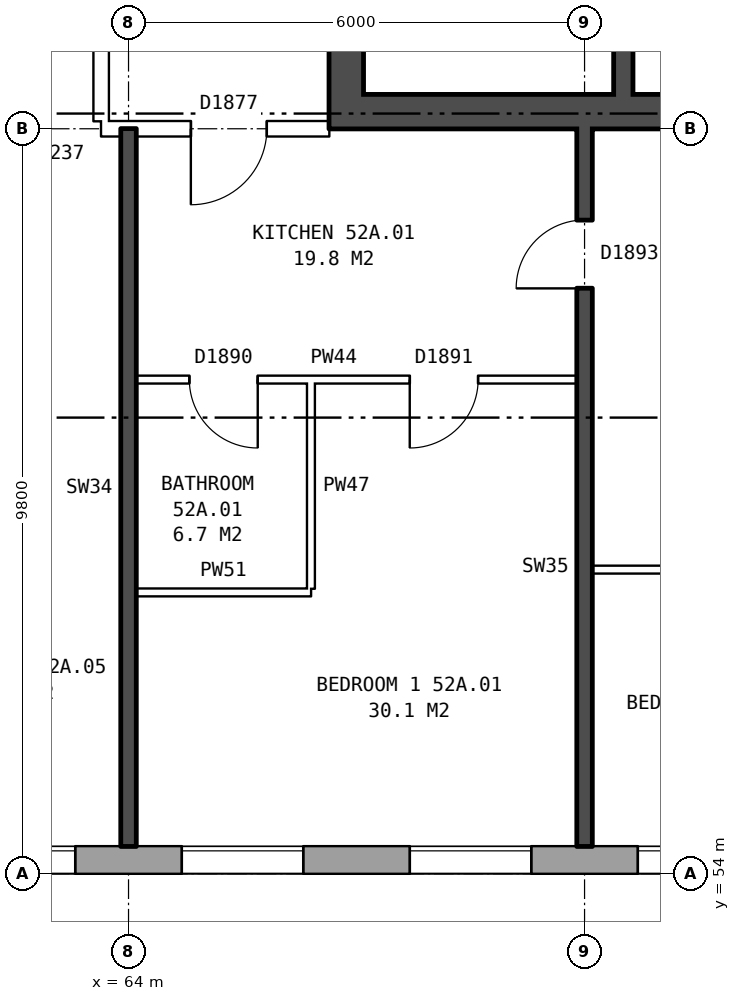
"""IFC4 building model, lengths in metres.
Left out: names, types, materials, properties, quantities, classifications, styles, units other than length and angle.
Written with IfcOpenShell. Run it as: python <this file> out.ifc"""

import sys

from ifc_helpers import new_model, si_unit, direction, frame, frame_2d, origin, place, context, subcontext, project, spatial, rectangle, extrude, element, fill, save


model = new_model("IFC4")
c1 = context("Model", 3, precision=1e-05, world=origin(), true_north=direction((0.0, 1.0)))
c2 = subcontext(c1, "Body", "Model", "MODEL_VIEW")
j1 = project(units=[si_unit("LENGTHUNIT", "METRE"), si_unit("PLANEANGLEUNIT", "RADIAN")], contexts=[c1])
p1 = place(None, origin())
s1 = spatial("IfcSite", under=j1, at=p1, CompositionType="ELEMENT")
p2 = place(p1, origin())
s2 = spatial("IfcBuilding", under=s1, at=p2, CompositionType="ELEMENT")
p3 = place(p2, frame((0.0, 0.0, 185.1)))
s3 = spatial("IfcBuildingStorey", under=s2, at=p3, CompositionType="ELEMENT", Elevation=185.1)
p4 = place(p3, frame((33.325, 54.18, 0.0), z_axis=(0.0, 0.0, 1.0), x_axis=(1.0, 0.0, 0.0)))
e1 = element("IfcWall", 1, at=p4, inside=s3, PredefinedType="STANDARD", context=c2, shape_type="SweptSolid", body=[
    extrude(rectangle(XDim=39.601, YDim=0.36, at=frame_2d((19.8, 0.0))), origin(), (0.0, 0.0, 1.0), 2.85),
])
p5 = place(p4, frame((1.375, 0.0, 0.8)))
e2 = element("IfcOpeningElement", 2, at=p5, cuts=e1, PredefinedType="OPENING", context=c2, shape_type="SweptSolid", body=[
    extrude(rectangle(XDim=1.6, YDim=1.8, at=frame_2d((0.8, 0.9))), frame((0.0, 0.19, 0.0), z_axis=(0.0, -1.0, 0.0), x_axis=(1.0, 0.0, 0.0)), (0.0, 0.0, 1.0), 0.38),
])
p6 = place(p4, frame((4.375, 0.0, 0.8)))
e3 = element("IfcOpeningElement", 3, at=p6, cuts=e1, PredefinedType="OPENING", context=c2, shape_type="SweptSolid", body=[
    extrude(rectangle(XDim=1.6, YDim=1.8, at=frame_2d((0.8, 0.9))), frame((0.0, 0.19, 0.0), z_axis=(0.0, -1.0, 0.0), x_axis=(1.0, 0.0, 0.0)), (0.0, 0.0, 1.0), 0.38),
])
p7 = place(p4, frame((7.375, 0.0, 0.8)))
e4 = element("IfcOpeningElement", 4, at=p7, cuts=e1, PredefinedType="OPENING", context=c2, shape_type="SweptSolid", body=[
    extrude(rectangle(XDim=1.6, YDim=1.8, at=frame_2d((0.8, 0.9))), frame((0.0, 0.19, 0.0), z_axis=(0.0, -1.0, 0.0), x_axis=(1.0, 0.0, 0.0)), (0.0, 0.0, 1.0), 0.38),
])
p8 = place(p4, frame((9.275, 0.0, 0.8)))
e5 = element("IfcOpeningElement", 5, at=p8, cuts=e1, PredefinedType="OPENING", context=c2, shape_type="SweptSolid", body=[
    extrude(rectangle(XDim=1.6, YDim=1.8, at=frame_2d((0.8, 0.9))), frame((0.0, 0.19, 0.0), z_axis=(0.0, -1.0, 0.0), x_axis=(1.0, 0.0, 0.0)), (0.0, 0.0, 1.0), 0.38),
])
p9 = place(p4, frame((13.075, 0.0, 0.8)))
e6 = element("IfcOpeningElement", 6, at=p9, cuts=e1, PredefinedType="OPENING", context=c2, shape_type="SweptSolid", body=[
    extrude(rectangle(XDim=0.6, YDim=0.9, at=frame_2d((0.3, 0.45))), frame((0.0, 0.19, 0.0), z_axis=(0.0, -1.0, 0.0), x_axis=(1.0, 0.0, 0.0)), (0.0, 0.0, 1.0), 0.38),
])
p10 = place(p4, frame((16.375, 0.0, 0.8)))
e7 = element("IfcOpeningElement", 7, at=p10, cuts=e1, PredefinedType="OPENING", context=c2, shape_type="SweptSolid", body=[
    extrude(rectangle(XDim=1.6, YDim=1.8, at=frame_2d((0.8, 0.9))), frame((0.0, 0.19, 0.0), z_axis=(0.0, -1.0, 0.0), x_axis=(1.0, 0.0, 0.0)), (0.0, 0.0, 1.0), 0.38),
])
p11 = place(p4, frame((19.375, 0.0, 0.8)))
e8 = element("IfcOpeningElement", 8, at=p11, cuts=e1, PredefinedType="OPENING", context=c2, shape_type="SweptSolid", body=[
    extrude(rectangle(XDim=1.6, YDim=1.8, at=frame_2d((0.8, 0.9))), frame((0.0, 0.19, 0.0), z_axis=(0.0, -1.0, 0.0), x_axis=(1.0, 0.0, 0.0)), (0.0, 0.0, 1.0), 0.38),
])
p12 = place(p4, frame((22.375, 0.0, 0.8)))
e9 = element("IfcOpeningElement", 9, at=p12, cuts=e1, PredefinedType="OPENING", context=c2, shape_type="SweptSolid", body=[
    extrude(rectangle(XDim=1.6, YDim=1.8, at=frame_2d((0.8, 0.9))), frame((0.0, 0.19, 0.0), z_axis=(0.0, -1.0, 0.0), x_axis=(1.0, 0.0, 0.0)), (0.0, 0.0, 1.0), 0.38),
])
p13 = place(p4, frame((24.875, 0.0, 0.75)))
e10 = element("IfcOpeningElement", 10, at=p13, cuts=e1, PredefinedType="OPENING", context=c2, shape_type="SweptSolid", body=[
    extrude(rectangle(XDim=0.8, YDim=1.8, at=frame_2d((0.4, 0.9))), frame((0.0, 0.19, 0.0), z_axis=(0.0, -1.0, 0.0), x_axis=(1.0, 0.0, 0.0)), (0.0, 0.0, 1.0), 0.38),
])
p14 = place(p4, frame((28.375, 0.0, 0.8)))
e11 = element("IfcOpeningElement", 11, at=p14, cuts=e1, PredefinedType="OPENING", context=c2, shape_type="SweptSolid", body=[
    extrude(rectangle(XDim=1.6, YDim=1.8, at=frame_2d((0.8, 0.9))), frame((0.0, 0.19, 0.0), z_axis=(0.0, -1.0, 0.0), x_axis=(1.0, 0.0, 0.0)), (0.0, 0.0, 1.0), 0.38),
])
p15 = place(p4, frame((31.375, 0.0, 0.8)))
e12 = element("IfcOpeningElement", 12, at=p15, cuts=e1, PredefinedType="OPENING", context=c2, shape_type="SweptSolid", body=[
    extrude(rectangle(XDim=1.6, YDim=1.8, at=frame_2d((0.8, 0.9))), frame((0.0, 0.19, 0.0), z_axis=(0.0, -1.0, 0.0), x_axis=(1.0, 0.0, 0.0)), (0.0, 0.0, 1.0), 0.38),
])
p16 = place(p4, frame((34.375, 0.0, 0.8)))
e13 = element("IfcOpeningElement", 13, at=p16, cuts=e1, PredefinedType="OPENING", context=c2, shape_type="SweptSolid", body=[
    extrude(rectangle(XDim=1.6, YDim=1.8, at=frame_2d((0.8, 0.9))), frame((0.0, 0.19, 0.0), z_axis=(0.0, -1.0, 0.0), x_axis=(1.0, 0.0, 0.0)), (0.0, 0.0, 1.0), 0.38),
])
p17 = place(p4, frame((37.375, 0.0, 0.8)))
e14 = element("IfcOpeningElement", 14, at=p17, cuts=e1, PredefinedType="OPENING", context=c2, shape_type="SweptSolid", body=[
    extrude(rectangle(XDim=1.6, YDim=1.8, at=frame_2d((0.8, 0.9))), frame((0.0, 0.19, 0.0), z_axis=(0.0, -1.0, 0.0), x_axis=(1.0, 0.0, 0.0)), (0.0, 0.0, 1.0), 0.38),
])
p18 = place(p4, frame((11.175, 0.0, 1.7)))
e15 = element("IfcOpeningElement", 15, at=p18, cuts=e1, PredefinedType="OPENING", context=c2, shape_type="SweptSolid", body=[
    extrude(rectangle(XDim=0.8, YDim=0.9, at=frame_2d((0.4, 0.45))), frame((0.0, 0.19, 0.0), z_axis=(0.0, -1.0, 0.0), x_axis=(1.0, 0.0, 0.0)), (0.0, 0.0, 1.0), 0.38),
])
p19 = place(p4, frame((13.975, 0.0, 0.8)))
e16 = element("IfcOpeningElement", 16, at=p19, cuts=e1, PredefinedType="OPENING", context=c2, shape_type="SweptSolid", body=[
    extrude(rectangle(XDim=1.4, YDim=1.8, at=frame_2d((0.7, 0.9))), frame((0.0, 0.19, 0.0), z_axis=(0.0, -1.0, 0.0), x_axis=(1.0, 0.0, 0.0)), (0.0, 0.0, 1.0), 0.38),
])
p20 = place(p4, frame((25.975, 0.0, 0.55)))
e17 = element("IfcOpeningElement", 17, at=p20, cuts=e1, PredefinedType="OPENING", context=c2, shape_type="SweptSolid", body=[
    extrude(rectangle(XDim=0.8, YDim=0.9, at=frame_2d((0.4, 0.45))), frame((0.0, 0.19, 0.0), z_axis=(0.0, -1.0, 0.0), x_axis=(1.0, 0.0, 0.0)), (0.0, 0.0, 1.0), 0.38),
])
p21 = place(p3, frame((66.865, 63.8, 0.0), z_axis=(0.0, 0.0, 1.0), x_axis=(0.0, 1.0, 0.0)))
e18 = element("IfcWall", 18, at=p21, inside=s3, PredefinedType="SHEAR", context=c2, shape_type="SweptSolid", body=[
    extrude(rectangle(XDim=12.4, YDim=0.45, at=frame_2d((6.2, 0.0))), origin(), (0.0, 0.0, 1.0), 2.85),
])
p22 = place(p21, frame((1.325, 0.0, 0.0)))
e19 = element("IfcOpeningElement", 19, at=p22, cuts=e18, PredefinedType="OPENING", context=c2, shape_type="SweptSolid", body=[
    extrude(rectangle(XDim=1.1, YDim=2.1, at=frame_2d((0.55, 1.05))), frame((0.0, 0.235, 0.0), z_axis=(0.0, -1.0, 0.0), x_axis=(1.0, 0.0, 0.0)), (0.0, 0.0, 1.0), 0.47),
])
p23 = place(p21, frame((3.6, 0.0, 0.0)))
e20 = element("IfcOpeningElement", 20, at=p23, cuts=e18, PredefinedType="OPENING", context=c2, shape_type="SweptSolid", body=[
    extrude(rectangle(XDim=1.1, YDim=2.1, at=frame_2d((0.55, 1.05))), frame((0.0, 0.235, 0.0), z_axis=(0.0, -1.0, 0.0), x_axis=(1.0, 0.0, 0.0)), (0.0, 0.0, 1.0), 0.47),
])
p24 = place(p21, frame((5.8, 0.0, 0.0)))
e21 = element("IfcOpeningElement", 21, at=p24, cuts=e18, PredefinedType="OPENING", context=c2, shape_type="SweptSolid", body=[
    extrude(rectangle(XDim=1.1, YDim=2.1, at=frame_2d((0.55, 1.05))), frame((0.0, 0.235, 0.0), z_axis=(0.0, -1.0, 0.0), x_axis=(1.0, 0.0, 0.0)), (0.0, 0.0, 1.0), 0.47),
])
p25 = place(p21, frame((8.0, 0.0, 0.0)))
e22 = element("IfcOpeningElement", 22, at=p25, cuts=e18, PredefinedType="OPENING", context=c2, shape_type="SweptSolid", body=[
    extrude(rectangle(XDim=1.1, YDim=2.1, at=frame_2d((0.55, 1.05))), frame((0.0, 0.235, 0.0), z_axis=(0.0, -1.0, 0.0), x_axis=(1.0, 0.0, 0.0)), (0.0, 0.0, 1.0), 0.47),
])
p26 = place(p21, frame((9.9, 0.0, 0.0)))
e23 = element("IfcOpeningElement", 23, at=p26, cuts=e18, PredefinedType="OPENING", context=c2, shape_type="SweptSolid", body=[
    extrude(rectangle(XDim=1.1, YDim=2.1, at=frame_2d((0.55, 1.05))), frame((0.0, 0.235, 0.0), z_axis=(0.0, -1.0, 0.0), x_axis=(1.0, 0.0, 0.0)), (0.0, 0.0, 1.0), 0.47),
])
p27 = place(p3, frame((67.09, 64.025, 0.0), z_axis=(0.0, 0.0, 1.0), x_axis=(1.0, 0.0, 0.0)))
e24 = element("IfcWall", 24, at=p27, inside=s3, PredefinedType="SHEAR", context=c2, shape_type="SweptSolid", body=[
    extrude(rectangle(XDim=8.1, YDim=0.45, at=frame_2d((4.05, 0.0))), origin(), (0.0, 0.0, 1.0), 2.85),
])
p28 = place(p3, frame((70.51, 64.25, 0.0), z_axis=(0.0, 0.0, 1.0), x_axis=(0.0, 1.0, 0.0)))
e25 = element("IfcWall", 25, at=p28, inside=s3, PredefinedType="SHEAR", context=c2, shape_type="SweptSolid", body=[
    extrude(rectangle(XDim=2.475, YDim=0.25, at=frame_2d((1.238, 0.0))), origin(), (0.0, 0.0, 1.0), 2.85),
])
p29 = place(p3, frame((63.64, 63.9, 0.0), z_axis=(0.0, 0.0, 1.0), x_axis=(0.0, 1.0, 0.0)))
e26 = element("IfcWall", 26, at=p29, inside=s3, PredefinedType="PARTITIONING", context=c2, shape_type="SweptSolid", body=[
    extrude(rectangle(XDim=12.2, YDim=0.2, at=frame_2d((6.1, 0.0))), origin(), (0.0, 0.0, 1.0), 2.85),
])
p30 = place(p29, frame((5.1, 0.0, 0.0)))
e27 = element("IfcOpeningElement", 27, at=p30, cuts=e26, PredefinedType="OPENING", context=c2, shape_type="SweptSolid", body=[
    extrude(rectangle(XDim=2.0, YDim=2.1, at=frame_2d((1.0, 1.05))), frame((0.0, 0.11, 0.0), z_axis=(0.0, -1.0, 0.0), x_axis=(1.0, 0.0, 0.0)), (0.0, 0.0, 1.0), 0.22),
])
p31 = place(p3, frame((64.1, 57.7, 0.0), z_axis=(0.0, 0.0, 1.0), x_axis=(1.0, 0.0, 0.0)))
e28 = element("IfcWall", 28, at=p31, inside=s3, PredefinedType="PARTITIONING", context=c2, shape_type="SweptSolid", body=[
    extrude(rectangle(XDim=2.3, YDim=0.1, at=frame_2d((1.15, 0.0))), origin(), (0.0, 0.0, 1.0), 2.85),
])
p32 = place(p3, frame((70.1, 58.0, 0.0), z_axis=(0.0, 0.0, 1.0), x_axis=(1.0, 0.0, 0.0)))
e29 = element("IfcWall", 29, at=p32, inside=s3, PredefinedType="PARTITIONING", context=c2, shape_type="SweptSolid", body=[
    extrude(rectangle(XDim=5.54, YDim=0.1, at=frame_2d((2.77, 0.0))), origin(), (0.0, 0.0, 1.0), 2.85),
])
p33 = place(p32, frame((2.32, 0.0, 0.0)))
e30 = element("IfcOpeningElement", 30, at=p33, cuts=e29, PredefinedType="OPENING", context=c2, shape_type="SweptSolid", body=[
    extrude(rectangle(XDim=0.9, YDim=2.1, at=frame_2d((0.45, 1.05))), frame((0.0, 0.06, 0.0), z_axis=(0.0, -1.0, 0.0), x_axis=(1.0, 0.0, 0.0)), (0.0, 0.0, 1.0), 0.12),
])
p34 = place(p3, frame((64.1, 60.5, 0.0), z_axis=(0.0, 0.0, 1.0), x_axis=(1.0, 0.0, 0.0)))
e31 = element("IfcWall", 31, at=p34, inside=s3, PredefinedType="PARTITIONING", context=c2, shape_type="SweptSolid", body=[
    extrude(rectangle(XDim=5.8, YDim=0.1, at=frame_2d((2.9, 0.0))), origin(), (0.0, 0.0, 1.0), 2.85),
])
p35 = place(p34, frame((3.6, 0.0, 0.0)))
e32 = element("IfcOpeningElement", 32, at=p35, cuts=e31, PredefinedType="OPENING", context=c2, shape_type="SweptSolid", body=[
    extrude(rectangle(XDim=0.9, YDim=2.1, at=frame_2d((0.45, 1.05))), frame((0.0, 0.06, 0.0), z_axis=(0.0, -1.0, 0.0), x_axis=(1.0, 0.0, 0.0)), (0.0, 0.0, 1.0), 0.12),
])
p36 = place(p34, frame((0.7, 0.0, 0.0)))
e33 = element("IfcOpeningElement", 33, at=p36, cuts=e31, PredefinedType="OPENING", context=c2, shape_type="SweptSolid", body=[
    extrude(rectangle(XDim=0.9, YDim=2.1, at=frame_2d((0.45, 1.05))), frame((0.0, 0.06, 0.0), z_axis=(0.0, -1.0, 0.0), x_axis=(1.0, 0.0, 0.0)), (0.0, 0.0, 1.0), 0.12),
])
p37 = place(p3, frame((63.64, 63.8, 0.0), z_axis=(0.0, 0.0, 1.0), x_axis=(1.0, 0.0, 0.0)))
e34 = element("IfcWall", 34, at=p37, inside=s3, PredefinedType="PARTITIONING", context=c2, shape_type="SweptSolid", body=[
    extrude(rectangle(XDim=3.0, YDim=0.2, at=frame_2d((1.5, 0.0))), origin(), (0.0, 0.0, 1.0), 2.85),
])
p38 = place(p37, frame((1.18, 0.0, 0.0)))
e35 = element("IfcOpeningElement", 35, at=p38, cuts=e34, PredefinedType="OPENING", context=c2, shape_type="SweptSolid", body=[
    extrude(rectangle(XDim=1.0, YDim=2.1, at=frame_2d((0.5, 1.05))), frame((0.0, 0.11, 0.0), z_axis=(0.0, -1.0, 0.0), x_axis=(1.0, 0.0, 0.0)), (0.0, 0.0, 1.0), 0.22),
])
p39 = place(p3, frame((64.0, 54.36, 0.0), z_axis=(0.0, 0.0, 1.0), x_axis=(0.0, 1.0, 0.0)))
e36 = element("IfcWall", 36, at=p39, inside=s3, PredefinedType="SOLIDWALL", context=c2, shape_type="SweptSolid", body=[
    extrude(rectangle(XDim=9.44, YDim=0.2, at=frame_2d((4.72, 0.0))), origin(), (0.0, 0.0, 1.0), 2.85),
])
p40 = place(p3, frame((66.4, 57.75, 0.0), z_axis=(0.0, 0.0, 1.0), x_axis=(0.0, 1.0, 0.0)))
e37 = element("IfcWall", 37, at=p40, inside=s3, PredefinedType="PARTITIONING", context=c2, shape_type="SweptSolid", body=[
    extrude(rectangle(XDim=2.7, YDim=0.1, at=frame_2d((1.35, 0.0))), origin(), (0.0, 0.0, 1.0), 2.85),
])
p41 = place(p3, frame((70.0, 54.36, 0.0), z_axis=(0.0, 0.0, 1.0), x_axis=(0.0, 1.0, 0.0)))
e38 = element("IfcWall", 38, at=p41, inside=s3, PredefinedType="SOLIDWALL", context=c2, shape_type="SweptSolid", body=[
    extrude(rectangle(XDim=9.44, YDim=0.2, at=frame_2d((4.72, 0.0))), origin(), (0.0, 0.0, 1.0), 2.85),
])
p42 = place(p41, frame((7.34, 0.0, 0.0)))
e39 = element("IfcOpeningElement", 39, at=p42, cuts=e38, PredefinedType="OPENING", context=c2, shape_type="SweptSolid", body=[
    extrude(rectangle(XDim=0.9, YDim=2.1, at=frame_2d((0.45, 1.05))), frame((0.0, 0.11, 0.0), z_axis=(0.0, -1.0, 0.0), x_axis=(1.0, 0.0, 0.0)), (0.0, 0.0, 1.0), 0.22),
])
p43 = place(p14, origin())
e40 = element("IfcWindow", 40, at=p43, inside=s3, PartitioningType="SINGLE_PANEL", PredefinedType="WINDOW", context=c2, shape_type="SweptSolid", body=[
    extrude(rectangle(XDim=1.6, YDim=1.8, at=frame_2d((0.8, 0.9))), frame((0.0, 0.15, 0.0), z_axis=(0.0, -1.0, 0.0), x_axis=(1.0, 0.0, 0.0)), (0.0, 0.0, 1.0), 0.06),
])
fill(e11, e40)
p44 = place(p15, origin())
e41 = element("IfcWindow", 41, at=p44, inside=s3, PartitioningType="SINGLE_PANEL", PredefinedType="WINDOW", context=c2, shape_type="SweptSolid", body=[
    extrude(rectangle(XDim=1.6, YDim=1.8, at=frame_2d((0.8, 0.9))), frame((0.0, 0.15, 0.0), z_axis=(0.0, -1.0, 0.0), x_axis=(1.0, 0.0, 0.0)), (0.0, 0.0, 1.0), 0.06),
])
fill(e12, e41)
p45 = place(p16, origin())
e42 = element("IfcWindow", 42, at=p45, inside=s3, PartitioningType="SINGLE_PANEL", PredefinedType="WINDOW", context=c2, shape_type="SweptSolid", body=[
    extrude(rectangle(XDim=1.6, YDim=1.8, at=frame_2d((0.8, 0.9))), frame((0.0, 0.15, 0.0), z_axis=(0.0, -1.0, 0.0), x_axis=(1.0, 0.0, 0.0)), (0.0, 0.0, 1.0), 0.06),
])
fill(e13, e42)
p46 = place(p17, origin())
e43 = element("IfcWindow", 43, at=p46, inside=s3, PartitioningType="SINGLE_PANEL", PredefinedType="WINDOW", context=c2, shape_type="SweptSolid", body=[
    extrude(rectangle(XDim=1.6, YDim=1.8, at=frame_2d((0.8, 0.9))), frame((0.0, 0.15, 0.0), z_axis=(0.0, -1.0, 0.0), x_axis=(1.0, 0.0, 0.0)), (0.0, 0.0, 1.0), 0.06),
])
fill(e14, e43)
p47 = place(p35, frame((0.9, 0.0, 0.0), z_axis=(0.0, 0.0, 1.0), x_axis=(-1.0, 0.0, 0.0)))
e44 = element("IfcDoor", 44, at=p47, inside=s3, OperationType="SINGLE_SWING_RIGHT", PredefinedType="DOOR", context=c2, shape_type="SweptSolid", body=[
    extrude(rectangle(XDim=0.9, YDim=2.1, at=frame_2d((0.45, 1.05))), frame((0.0, 0.025, 0.0), z_axis=(0.0, -1.0, 0.0), x_axis=(1.0, 0.0, 0.0)), (0.0, 0.0, 1.0), 0.05),
])
fill(e32, e44)
p48 = place(p38, frame((1.0, 0.0, 0.0), z_axis=(0.0, 0.0, 1.0), x_axis=(-1.0, 0.0, 0.0)))
e45 = element("IfcDoor", 45, at=p48, inside=s3, OperationType="SINGLE_SWING_RIGHT", PredefinedType="DOOR", context=c2, shape_type="SweptSolid", body=[
    extrude(rectangle(XDim=1.0, YDim=2.1, at=frame_2d((0.5, 1.05))), frame((0.0, 0.025, 0.0), z_axis=(0.0, -1.0, 0.0), x_axis=(1.0, 0.0, 0.0)), (0.0, 0.0, 1.0), 0.05),
])
fill(e35, e45)
p49 = place(p42, origin())
e46 = element("IfcDoor", 46, at=p49, inside=s3, OperationType="SINGLE_SWING_LEFT", PredefinedType="DOOR", context=c2, shape_type="SweptSolid", body=[
    extrude(rectangle(XDim=0.9, YDim=2.1, at=frame_2d((0.45, 1.05))), frame((0.0, 0.025, 0.0), z_axis=(0.0, -1.0, 0.0), x_axis=(1.0, 0.0, 0.0)), (0.0, 0.0, 1.0), 0.05),
])
fill(e39, e46)
p50 = place(p36, frame((0.9, 0.0, 0.0), z_axis=(0.0, 0.0, 1.0), x_axis=(-1.0, 0.0, 0.0)))
e47 = element("IfcDoor", 47, at=p50, inside=s3, OperationType="SINGLE_SWING_LEFT", PredefinedType="DOOR", context=c2, shape_type="SweptSolid", body=[
    extrude(rectangle(XDim=0.9, YDim=2.1, at=frame_2d((0.45, 1.05))), frame((0.0, 0.025, 0.0), z_axis=(0.0, -1.0, 0.0), x_axis=(1.0, 0.0, 0.0)), (0.0, 0.0, 1.0), 0.05),
])
fill(e33, e47)
save(model, sys.argv[1])
